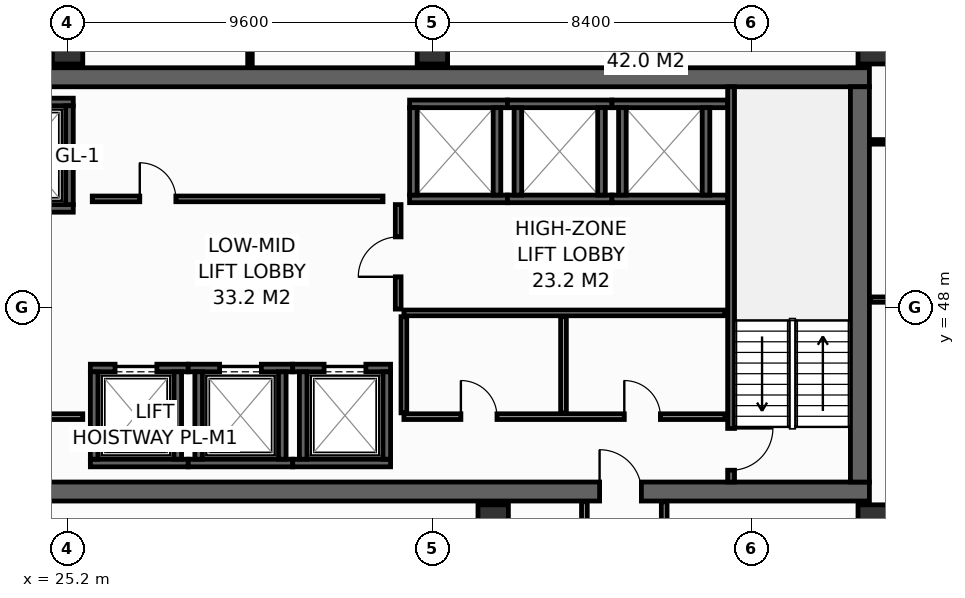
"""IFC4 building model, lengths in metres.
Left out: names, types, materials, properties, quantities, classifications, styles, units other than length and angle.
Written with IfcOpenShell. Run it as: python <this file> out.ifc"""

import sys

from ifc_helpers import new_model, si_unit, direction, frame, frame_2d, origin, origin_2d, place, context, subcontext, project, spatial, rectangle, hollow_rectangle, extrude, element, fill, save


model = new_model("IFC4")
c1 = context("Model", 3, precision=1e-05, world=origin(), true_north=direction((0.0, 1.0)))
c2 = subcontext(c1, "Body", "Model", "MODEL_VIEW")
j1 = project(units=[si_unit("LENGTHUNIT", "METRE"), si_unit("PLANEANGLEUNIT", "RADIAN")], contexts=[c1])
p1 = place(None, origin())
s1 = spatial("IfcSite", under=j1, at=p1, CompositionType="ELEMENT")
p2 = place(p1, origin())
s2 = spatial("IfcBuilding", under=s1, at=p2, CompositionType="ELEMENT")
p3 = place(p2, frame((0.0, 0.0, 217.0)))
s3 = spatial("IfcBuildingStorey", under=s2, at=p3, CompositionType="ELEMENT", Elevation=217.0)
p4 = place(p3, frame((13.6, 43.15, 0.0), z_axis=(0.0, 0.0, 1.0), x_axis=(1.0, 0.0, 0.0)))
e1 = element("IfcWall", 1, at=p4, inside=s3, PredefinedType="SHEAR", context=c2, shape_type="SweptSolid", body=[
    extrude(rectangle(XDim=32.7, YDim=0.5, at=frame_2d((16.35, 0.0))), origin(), (0.0, 0.0, 1.0), 3.55),
])
p5 = place(p4, frame((5.4, 0.0, 0.0)))
e2 = element("IfcOpeningElement", 2, at=p5, cuts=e1, PredefinedType="OPENING", context=c2, shape_type="SweptSolid", body=[
    extrude(rectangle(XDim=1.1, YDim=2.15, at=frame_2d((0.55, 1.075))), frame((0.0, 0.26, 0.0), z_axis=(0.0, -1.0, 0.0), x_axis=(1.0, 0.0, 0.0)), (0.0, 0.0, 1.0), 0.52),
])
p6 = place(p4, frame((25.6, 0.0, 0.0)))
e3 = element("IfcOpeningElement", 3, at=p6, cuts=e1, PredefinedType="OPENING", context=c2, shape_type="SweptSolid", body=[
    extrude(rectangle(XDim=1.1, YDim=2.15, at=frame_2d((0.55, 1.075))), frame((0.0, 0.26, 0.0), z_axis=(0.0, -1.0, 0.0), x_axis=(1.0, 0.0, 0.0)), (0.0, 0.0, 1.0), 0.52),
])
p7 = place(p3, frame((13.6, 54.05, 0.0), z_axis=(0.0, 0.0, 1.0), x_axis=(1.0, 0.0, 0.0)))
e4 = element("IfcWall", 4, at=p7, inside=s3, PredefinedType="SHEAR", context=c2, shape_type="SweptSolid", body=[
    extrude(rectangle(XDim=32.7, YDim=0.5, at=frame_2d((16.35, 0.0))), origin(), (0.0, 0.0, 1.0), 3.55),
])
p8 = place(p3, frame((46.05, 43.4, 0.0), z_axis=(0.0, 0.0, 1.0), x_axis=(0.0, 1.0, 0.0)))
e5 = element("IfcWall", 5, at=p8, inside=s3, PredefinedType="SHEAR", context=c2, shape_type="SweptSolid", body=[
    extrude(rectangle(XDim=10.4, YDim=0.5, at=frame_2d((5.2, 0.0))), origin(), (0.0, 0.0, 1.0), 3.55),
])
for number, where, z_axis, x_axis in (
    (6, (25.2, 54.8, 0.0), (0.0, 0.0, 1.0), (1.0, 0.0, 0.0)),
    (7, (34.8, 54.8, 0.0), (0.0, 0.0, 1.0), (1.0, 0.0, 0.0)),
    (8, (46.4, 54.8, 0.0), (0.0, 0.0, 1.0), (1.0, 0.0, 0.0)),
    (9, (36.4, 42.4, 0.0), (0.0, 0.0, 1.0), (1.0, 0.0, 0.0)),
    (10, (46.4, 42.4, 0.0), (0.0, 0.0, 1.0), (1.0, 0.0, 0.0)),
):
    element("IfcColumn", number, at=place(p3, frame(where, z_axis=z_axis, x_axis=x_axis)), inside=s3, PredefinedType="COLUMN", context=c2, shape_type="SweptSolid", body=[
        extrude(hollow_rectangle(XDim=0.8, YDim=0.8, WallThickness=0.036, at=origin_2d()), origin(), (0.0, 0.0, 1.0), 3.8),
    ])
p9 = place(p3, frame((22.5, 50.6, 0.0), z_axis=(0.0, 0.0, 1.0), x_axis=(1.0, 0.0, 0.0)))
e11 = element("IfcWall", 11, at=p9, inside=s3, PredefinedType="SHEAR", context=c2, shape_type="SweptSolid", body=[
    extrude(rectangle(XDim=2.85, YDim=0.2, at=frame_2d((1.425, 0.0))), origin(), (0.0, 0.0, 1.0), 3.55),
])
p10 = place(p9, frame((0.925, 0.0, 0.0)))
e12 = element("IfcOpeningElement", 12, at=p10, cuts=e11, PredefinedType="OPENING", context=c2, shape_type="SweptSolid", body=[
    extrude(rectangle(XDim=1.25, YDim=2.3, at=frame_2d((0.625, 1.15))), frame((0.0, 0.11, 0.0), z_axis=(0.0, -1.0, 0.0), x_axis=(1.0, 0.0, 0.0)), (0.0, 0.0, 1.0), 0.22),
])
p11 = place(p3, frame((22.5, 53.4, 0.0), z_axis=(0.0, 0.0, 1.0), x_axis=(1.0, 0.0, 0.0)))
e13 = element("IfcWall", 13, at=p11, inside=s3, PredefinedType="SHEAR", context=c2, shape_type="SweptSolid", body=[
    extrude(rectangle(XDim=2.85, YDim=0.2, at=frame_2d((1.425, 0.0))), origin(), (0.0, 0.0, 1.0), 3.55),
])
p12 = place(p3, frame((25.25, 50.7, 0.0), z_axis=(0.0, 0.0, 1.0), x_axis=(0.0, 1.0, 0.0)))
e14 = element("IfcWall", 14, at=p12, inside=s3, PredefinedType="SHEAR", context=c2, shape_type="SweptSolid", body=[
    extrude(rectangle(XDim=2.6, YDim=0.2, at=frame_2d((1.3, 0.0))), origin(), (0.0, 0.0, 1.0), 3.55),
])
p13 = place(p3, frame((25.8, 43.9, 0.0), z_axis=(0.0, 0.0, 1.0), x_axis=(1.0, 0.0, 0.0)))
e15 = element("IfcWall", 15, at=p13, inside=s3, PredefinedType="SHEAR", context=c2, shape_type="SweptSolid", body=[
    extrude(rectangle(XDim=2.575, YDim=0.2, at=frame_2d((1.288, 0.0))), origin(), (0.0, 0.0, 1.0), 3.55),
])
p14 = place(p3, frame((25.8, 46.4, 0.0), z_axis=(0.0, 0.0, 1.0), x_axis=(1.0, 0.0, 0.0)))
e16 = element("IfcWall", 16, at=p14, inside=s3, PredefinedType="SHEAR", context=c2, shape_type="SweptSolid", body=[
    extrude(rectangle(XDim=2.575, YDim=0.2, at=frame_2d((1.288, 0.0))), origin(), (0.0, 0.0, 1.0), 3.55),
])
p15 = place(p14, frame((0.65, 0.0, 0.0)))
e17 = element("IfcOpeningElement", 17, at=p15, cuts=e16, PredefinedType="OPENING", context=c2, shape_type="SweptSolid", body=[
    extrude(rectangle(XDim=1.1, YDim=2.2, at=frame_2d((0.55, 1.1))), frame((0.0, 0.11, 0.0), z_axis=(0.0, -1.0, 0.0), x_axis=(1.0, 0.0, 0.0)), (0.0, 0.0, 1.0), 0.22),
])
for number, where, z_axis, x_axis in (
    (18, (25.9, 44.0, 0.0), (0.0, 0.0, 1.0), (0.0, 1.0, 0.0)),
    (19, (28.1, 44.0, 0.0), (0.0, 0.0, 1.0), (0.0, 1.0, 0.0)),
):
    element("IfcWall", number, at=place(p3, frame(where, z_axis=z_axis, x_axis=x_axis)), inside=s3, PredefinedType="SHEAR", context=c2, shape_type="SweptSolid", body=[
        extrude(rectangle(XDim=2.3, YDim=0.2, at=frame_2d((1.15, 0.0))), origin(), (0.0, 0.0, 1.0), 3.55),
    ])
p16 = place(p3, frame((28.375, 43.9, 0.0), z_axis=(0.0, 0.0, 1.0), x_axis=(1.0, 0.0, 0.0)))
e20 = element("IfcWall", 20, at=p16, inside=s3, PredefinedType="SHEAR", context=c2, shape_type="SweptSolid", body=[
    extrude(rectangle(XDim=2.75, YDim=0.2, at=frame_2d((1.375, 0.0))), origin(), (0.0, 0.0, 1.0), 3.55),
])
p17 = place(p3, frame((28.375, 46.4, 0.0), z_axis=(0.0, 0.0, 1.0), x_axis=(1.0, 0.0, 0.0)))
e21 = element("IfcWall", 21, at=p17, inside=s3, PredefinedType="SHEAR", context=c2, shape_type="SweptSolid", body=[
    extrude(rectangle(XDim=2.75, YDim=0.2, at=frame_2d((1.375, 0.0))), origin(), (0.0, 0.0, 1.0), 3.55),
])
p18 = place(p17, frame((0.825, 0.0, 0.0)))
e22 = element("IfcOpeningElement", 22, at=p18, cuts=e21, PredefinedType="OPENING", context=c2, shape_type="SweptSolid", body=[
    extrude(rectangle(XDim=1.1, YDim=2.2, at=frame_2d((0.55, 1.1))), frame((0.0, 0.11, 0.0), z_axis=(0.0, -1.0, 0.0), x_axis=(1.0, 0.0, 0.0)), (0.0, 0.0, 1.0), 0.22),
])
for number, where, z_axis, x_axis in (
    (23, (28.65, 44.0, 0.0), (0.0, 0.0, 1.0), (0.0, 1.0, 0.0)),
    (24, (30.85, 44.0, 0.0), (0.0, 0.0, 1.0), (0.0, 1.0, 0.0)),
):
    element("IfcWall", number, at=place(p3, frame(where, z_axis=z_axis, x_axis=x_axis)), inside=s3, PredefinedType="SHEAR", context=c2, shape_type="SweptSolid", body=[
        extrude(rectangle(XDim=2.3, YDim=0.2, at=frame_2d((1.15, 0.0))), origin(), (0.0, 0.0, 1.0), 3.55),
    ])
p19 = place(p3, frame((31.125, 43.9, 0.0), z_axis=(0.0, 0.0, 1.0), x_axis=(1.0, 0.0, 0.0)))
e25 = element("IfcWall", 25, at=p19, inside=s3, PredefinedType="SHEAR", context=c2, shape_type="SweptSolid", body=[
    extrude(rectangle(XDim=2.575, YDim=0.2, at=frame_2d((1.288, 0.0))), origin(), (0.0, 0.0, 1.0), 3.55),
])
p20 = place(p3, frame((31.125, 46.4, 0.0), z_axis=(0.0, 0.0, 1.0), x_axis=(1.0, 0.0, 0.0)))
e26 = element("IfcWall", 26, at=p20, inside=s3, PredefinedType="SHEAR", context=c2, shape_type="SweptSolid", body=[
    extrude(rectangle(XDim=2.575, YDim=0.2, at=frame_2d((1.288, 0.0))), origin(), (0.0, 0.0, 1.0), 3.55),
])
p21 = place(p20, frame((0.825, 0.0, 0.0)))
e27 = element("IfcOpeningElement", 27, at=p21, cuts=e26, PredefinedType="OPENING", context=c2, shape_type="SweptSolid", body=[
    extrude(rectangle(XDim=1.1, YDim=2.2, at=frame_2d((0.55, 1.1))), frame((0.0, 0.11, 0.0), z_axis=(0.0, -1.0, 0.0), x_axis=(1.0, 0.0, 0.0)), (0.0, 0.0, 1.0), 0.22),
])
for number, where, z_axis, x_axis in (
    (28, (31.4, 44.0, 0.0), (0.0, 0.0, 1.0), (0.0, 1.0, 0.0)),
    (29, (33.6, 44.0, 0.0), (0.0, 0.0, 1.0), (0.0, 1.0, 0.0)),
):
    element("IfcWall", number, at=place(p3, frame(where, z_axis=z_axis, x_axis=x_axis)), inside=s3, PredefinedType="SHEAR", context=c2, shape_type="SweptSolid", body=[
        extrude(rectangle(XDim=2.3, YDim=0.2, at=frame_2d((1.15, 0.0))), origin(), (0.0, 0.0, 1.0), 3.55),
    ])
for number, where, z_axis, x_axis in (
    (30, (34.2, 50.85, 0.0), (0.0, 0.0, 1.0), (1.0, 0.0, 0.0)),
    (31, (34.2, 53.35, 0.0), (0.0, 0.0, 1.0), (1.0, 0.0, 0.0)),
):
    element("IfcWall", number, at=place(p3, frame(where, z_axis=z_axis, x_axis=x_axis)), inside=s3, PredefinedType="SHEAR", context=c2, shape_type="SweptSolid", body=[
        extrude(rectangle(XDim=2.575, YDim=0.2, at=frame_2d((1.288, 0.0))), origin(), (0.0, 0.0, 1.0), 3.55),
    ])
for number, where, z_axis, x_axis in (
    (32, (34.3, 50.95, 0.0), (0.0, 0.0, 1.0), (0.0, 1.0, 0.0)),
    (33, (36.5, 50.95, 0.0), (0.0, 0.0, 1.0), (0.0, 1.0, 0.0)),
):
    element("IfcWall", number, at=place(p3, frame(where, z_axis=z_axis, x_axis=x_axis)), inside=s3, PredefinedType="SHEAR", context=c2, shape_type="SweptSolid", body=[
        extrude(rectangle(XDim=2.3, YDim=0.2, at=frame_2d((1.15, 0.0))), origin(), (0.0, 0.0, 1.0), 3.55),
    ])
for number, where, z_axis, x_axis in (
    (34, (36.775, 50.85, 0.0), (0.0, 0.0, 1.0), (1.0, 0.0, 0.0)),
    (35, (36.775, 53.35, 0.0), (0.0, 0.0, 1.0), (1.0, 0.0, 0.0)),
):
    element("IfcWall", number, at=place(p3, frame(where, z_axis=z_axis, x_axis=x_axis)), inside=s3, PredefinedType="SHEAR", context=c2, shape_type="SweptSolid", body=[
        extrude(rectangle(XDim=2.75, YDim=0.2, at=frame_2d((1.375, 0.0))), origin(), (0.0, 0.0, 1.0), 3.55),
    ])
for number, where, z_axis, x_axis in (
    (36, (37.05, 50.95, 0.0), (0.0, 0.0, 1.0), (0.0, 1.0, 0.0)),
    (37, (39.25, 50.95, 0.0), (0.0, 0.0, 1.0), (0.0, 1.0, 0.0)),
):
    element("IfcWall", number, at=place(p3, frame(where, z_axis=z_axis, x_axis=x_axis)), inside=s3, PredefinedType="SHEAR", context=c2, shape_type="SweptSolid", body=[
        extrude(rectangle(XDim=2.3, YDim=0.2, at=frame_2d((1.15, 0.0))), origin(), (0.0, 0.0, 1.0), 3.55),
    ])
for number, where, z_axis, x_axis in (
    (38, (39.525, 50.85, 0.0), (0.0, 0.0, 1.0), (1.0, 0.0, 0.0)),
    (39, (39.525, 53.35, 0.0), (0.0, 0.0, 1.0), (1.0, 0.0, 0.0)),
):
    element("IfcWall", number, at=place(p3, frame(where, z_axis=z_axis, x_axis=x_axis)), inside=s3, PredefinedType="SHEAR", context=c2, shape_type="SweptSolid", body=[
        extrude(rectangle(XDim=3.045, YDim=0.2, at=frame_2d((1.522, 0.0))), origin(), (0.0, 0.0, 1.0), 3.55),
    ])
for number, where, z_axis, x_axis in (
    (40, (39.8, 50.95, 0.0), (0.0, 0.0, 1.0), (0.0, 1.0, 0.0)),
    (41, (42.0, 50.95, 0.0), (0.0, 0.0, 1.0), (0.0, 1.0, 0.0)),
):
    element("IfcWall", number, at=place(p3, frame(where, z_axis=z_axis, x_axis=x_axis)), inside=s3, PredefinedType="SHEAR", context=c2, shape_type="SweptSolid", body=[
        extrude(rectangle(XDim=2.3, YDim=0.2, at=frame_2d((1.15, 0.0))), origin(), (0.0, 0.0, 1.0), 3.55),
    ])
p22 = place(p3, frame((42.66, 53.8, 0.0), z_axis=(0.0, 0.0, 1.0), x_axis=(0.0, -1.0, 0.0)))
e42 = element("IfcWall", 42, at=p22, inside=s3, PredefinedType="SHEAR", context=c2, shape_type="SweptSolid", body=[
    extrude(rectangle(XDim=10.4, YDim=0.18, at=frame_2d((5.2, 0.0))), origin(), (0.0, 0.0, 1.0), 3.55),
])
p23 = place(p22, frame((8.99, 0.0, 0.0)))
e43 = element("IfcOpeningElement", 43, at=p23, cuts=e42, PredefinedType="OPENING", context=c2, shape_type="SweptSolid", body=[
    extrude(rectangle(XDim=1.1, YDim=2.15, at=frame_2d((0.55, 1.075))), frame((0.0, 0.1, 0.0), z_axis=(0.0, -1.0, 0.0), x_axis=(1.0, 0.0, 0.0)), (0.0, 0.0, 1.0), 0.2),
])
p24 = place(p3, frame((22.68, 45.12, 0.0), z_axis=(0.0, 0.0, 1.0), x_axis=(1.0, 0.0, 0.0)))
e44 = element("IfcWall", 44, at=p24, inside=s3, PredefinedType="PARTITIONING", context=c2, shape_type="SweptSolid", body=[
    extrude(rectangle(XDim=2.92, YDim=0.15, at=frame_2d((1.46, 0.0))), origin(), (0.0, 0.0, 1.0), 3.55),
])
p25 = place(p24, frame((0.85, 0.0, 0.0)))
e45 = element("IfcOpeningElement", 45, at=p25, cuts=e44, PredefinedType="OPENING", context=c2, shape_type="SweptSolid", body=[
    extrude(rectangle(XDim=1.1, YDim=2.15, at=frame_2d((0.55, 1.075))), frame((0.0, 0.085, 0.0), z_axis=(0.0, -1.0, 0.0), x_axis=(1.0, 0.0, 0.0)), (0.0, 0.0, 1.0), 0.17),
])
p26 = place(p3, frame((33.9, 47.95, 0.0), z_axis=(0.0, 0.0, 1.0), x_axis=(0.0, 1.0, 0.0)))
e46 = element("IfcWall", 46, at=p26, inside=s3, PredefinedType="PARTITIONING", context=c2, shape_type="SweptSolid", body=[
    extrude(rectangle(XDim=2.75, YDim=0.15, at=frame_2d((1.375, 0.0))), origin(), (0.0, 0.0, 1.0), 3.55),
])
p27 = place(p26, frame((0.85, 0.0, 0.0)))
e47 = element("IfcOpeningElement", 47, at=p27, cuts=e46, PredefinedType="OPENING", context=c2, shape_type="SweptSolid", body=[
    extrude(rectangle(XDim=1.05, YDim=2.15, at=frame_2d((0.525, 1.075))), frame((0.0, 0.085, 0.0), z_axis=(0.0, -1.0, 0.0), x_axis=(1.0, 0.0, 0.0)), (0.0, 0.0, 1.0), 0.17),
])
p28 = place(p3, frame((34.05, 45.12, 0.0), z_axis=(0.0, 0.0, 1.0), x_axis=(1.0, 0.0, 0.0)))
e48 = element("IfcWall", 48, at=p28, inside=s3, PredefinedType="PARTITIONING", context=c2, shape_type="SweptSolid", body=[
    extrude(rectangle(XDim=8.45, YDim=0.15, at=frame_2d((4.225, 0.0))), origin(), (0.0, 0.0, 1.0), 3.55),
])
p29 = place(p28, frame((1.5, 0.0, 0.0)))
e49 = element("IfcOpeningElement", 49, at=p29, cuts=e48, PredefinedType="OPENING", context=c2, shape_type="SweptSolid", body=[
    extrude(rectangle(XDim=0.95, YDim=2.15, at=frame_2d((0.475, 1.075))), frame((0.0, 0.085, 0.0), z_axis=(0.0, -1.0, 0.0), x_axis=(1.0, 0.0, 0.0)), (0.0, 0.0, 1.0), 0.17),
])
p30 = place(p28, frame((5.8, 0.0, 0.0)))
e50 = element("IfcOpeningElement", 50, at=p30, cuts=e48, PredefinedType="OPENING", context=c2, shape_type="SweptSolid", body=[
    extrude(rectangle(XDim=0.95, YDim=2.15, at=frame_2d((0.475, 1.075))), frame((0.0, 0.085, 0.0), z_axis=(0.0, -1.0, 0.0), x_axis=(1.0, 0.0, 0.0)), (0.0, 0.0, 1.0), 0.17),
])
p31 = place(p3, frame((34.05, 47.85, 0.0), z_axis=(0.0, 0.0, 1.0), x_axis=(1.0, 0.0, 0.0)))
e51 = element("IfcWall", 51, at=p31, inside=s3, PredefinedType="PARTITIONING", context=c2, shape_type="SweptSolid", body=[
    extrude(rectangle(XDim=8.45, YDim=0.15, at=frame_2d((4.225, 0.0))), origin(), (0.0, 0.0, 1.0), 3.55),
])
for number, where, z_axis, x_axis in (
    (52, (38.25, 45.22, 0.0), (0.0, 0.0, 1.0), (0.0, 1.0, 0.0)),
    (53, (34.05, 45.22, 0.0), (0.0, 0.0, 1.0), (0.0, 1.0, 0.0)),
):
    element("IfcWall", number, at=place(p3, frame(where, z_axis=z_axis, x_axis=x_axis)), inside=s3, PredefinedType="PARTITIONING", context=c2, shape_type="SweptSolid", body=[
        extrude(rectangle(XDim=2.53, YDim=0.15, at=frame_2d((1.265, 0.0))), origin(), (0.0, 0.0, 1.0), 3.55),
    ])
p32 = place(p3, frame((25.85, 50.85, 0.0), z_axis=(0.0, 0.0, 1.0), x_axis=(1.0, 0.0, 0.0)))
e54 = element("IfcWall", 54, at=p32, inside=s3, PredefinedType="PARTITIONING", context=c2, shape_type="SweptSolid", body=[
    extrude(rectangle(XDim=7.65, YDim=0.15, at=frame_2d((3.825, 0.0))), origin(), (0.0, 0.0, 1.0), 3.55),
])
p33 = place(p32, frame((1.25, 0.0, 0.0)))
e55 = element("IfcOpeningElement", 55, at=p33, cuts=e54, PredefinedType="OPENING", context=c2, shape_type="SweptSolid", body=[
    extrude(rectangle(XDim=0.95, YDim=2.15, at=frame_2d((0.475, 1.075))), frame((0.0, 0.085, 0.0), z_axis=(0.0, -1.0, 0.0), x_axis=(1.0, 0.0, 0.0)), (0.0, 0.0, 1.0), 0.17),
])
p34 = place(p3, frame((46.15, 40.84, 0.0), z_axis=(0.0, 0.0, 1.0), x_axis=(0.0, 1.0, 0.0)))
e56 = element("IfcWall", 56, at=p34, inside=s3, PredefinedType="PARTITIONING", context=c2, shape_type="SweptSolid", body=[
    extrude(rectangle(XDim=2.04, YDim=0.14, at=frame_2d((1.02, 0.0))), origin(), (0.0, 0.0, 1.0), 3.55),
])
p35 = place(p3, frame((46.32, 48.2, 0.0), z_axis=(0.0, 0.0, 1.0), x_axis=(1.0, 0.0, 0.0)))
e57 = element("IfcWall", 57, at=p35, inside=s3, PredefinedType="PARTITIONING", context=c2, shape_type="SweptSolid", body=[
    extrude(rectangle(XDim=3.88, YDim=0.14, at=frame_2d((1.94, 0.0))), origin(), (0.0, 0.0, 1.0), 3.55),
])
p36 = place(p3, frame((46.32, 52.35, 0.0), z_axis=(0.0, 0.0, 1.0), x_axis=(1.0, 0.0, 0.0)))
e58 = element("IfcWall", 58, at=p36, inside=s3, PredefinedType="PARTITIONING", context=c2, shape_type="SweptSolid", body=[
    extrude(rectangle(XDim=3.88, YDim=0.12, at=frame_2d((1.94, 0.0))), origin(), (0.0, 0.0, 1.0), 3.55),
])
p37 = place(p3, frame((30.0, 54.32, 0.0), z_axis=(0.0, 0.0, 1.0), x_axis=(0.0, 1.0, 0.0)))
e59 = element("IfcWall", 59, at=p37, inside=s3, PredefinedType="PARTITIONING", context=c2, shape_type="SweptSolid", body=[
    extrude(rectangle(XDim=1.675, YDim=0.12, at=frame_2d((0.837, 0.0))), origin(), (0.0, 0.0, 1.0), 2.935),
])
for number, where, z_axis, x_axis in (
    (60, (38.8, 40.75, 0.0), (0.0, 0.0, 1.0), (0.0, 1.0, 0.0)),
    (61, (40.9, 40.75, 0.0), (0.0, 0.0, 1.0), (0.0, 1.0, 0.0)),
):
    element("IfcWall", number, at=place(p3, frame(where, z_axis=z_axis, x_axis=x_axis)), inside=s3, PredefinedType="PARTITIONING", context=c2, shape_type="SweptSolid", body=[
        extrude(rectangle(XDim=2.13, YDim=0.15, at=frame_2d((1.065, 0.0))), origin(), (0.0, 0.0, 1.0), 3.55),
    ])
p38 = place(p15, origin())
e62 = element("IfcDoor", 62, at=p38, inside=s3, OperationType="SLIDING_TO_LEFT", PredefinedType="DOOR", context=c2, shape_type="SweptSolid", body=[
    extrude(rectangle(XDim=1.1, YDim=2.2, at=frame_2d((0.55, 1.1))), frame((0.0, 0.025, 0.0), z_axis=(0.0, -1.0, 0.0), x_axis=(1.0, 0.0, 0.0)), (0.0, 0.0, 1.0), 0.05),
])
fill(e17, e62)
p39 = place(p18, origin())
e63 = element("IfcDoor", 63, at=p39, inside=s3, OperationType="SLIDING_TO_LEFT", PredefinedType="DOOR", context=c2, shape_type="SweptSolid", body=[
    extrude(rectangle(XDim=1.1, YDim=2.2, at=frame_2d((0.55, 1.1))), frame((0.0, 0.025, 0.0), z_axis=(0.0, -1.0, 0.0), x_axis=(1.0, 0.0, 0.0)), (0.0, 0.0, 1.0), 0.05),
])
fill(e22, e63)
p40 = place(p21, origin())
e64 = element("IfcDoor", 64, at=p40, inside=s3, OperationType="SLIDING_TO_LEFT", PredefinedType="DOOR", context=c2, shape_type="SweptSolid", body=[
    extrude(rectangle(XDim=1.1, YDim=2.2, at=frame_2d((0.55, 1.1))), frame((0.0, 0.025, 0.0), z_axis=(0.0, -1.0, 0.0), x_axis=(1.0, 0.0, 0.0)), (0.0, 0.0, 1.0), 0.05),
])
fill(e27, e64)
p41 = place(p23, origin())
e65 = element("IfcDoor", 65, at=p41, inside=s3, OperationType="SINGLE_SWING_LEFT", PredefinedType="DOOR", context=c2, shape_type="SweptSolid", body=[
    extrude(rectangle(XDim=1.1, YDim=2.15, at=frame_2d((0.55, 1.075))), frame((0.0, 0.025, 0.0), z_axis=(0.0, -1.0, 0.0), x_axis=(1.0, 0.0, 0.0)), (0.0, 0.0, 1.0), 0.05),
])
fill(e43, e65)
p42 = place(p6, origin())
e66 = element("IfcDoor", 66, at=p42, inside=s3, OperationType="SINGLE_SWING_LEFT", PredefinedType="DOOR", context=c2, shape_type="SweptSolid", body=[
    extrude(rectangle(XDim=1.1, YDim=2.15, at=frame_2d((0.55, 1.075))), frame((0.0, 0.025, 0.0), z_axis=(0.0, -1.0, 0.0), x_axis=(1.0, 0.0, 0.0)), (0.0, 0.0, 1.0), 0.05),
])
fill(e3, e66)
p43 = place(p27, origin())
e67 = element("IfcDoor", 67, at=p43, inside=s3, OperationType="SINGLE_SWING_LEFT", PredefinedType="DOOR", context=c2, shape_type="SweptSolid", body=[
    extrude(rectangle(XDim=1.05, YDim=2.15, at=frame_2d((0.525, 1.075))), frame((0.0, 0.025, 0.0), z_axis=(0.0, -1.0, 0.0), x_axis=(1.0, 0.0, 0.0)), (0.0, 0.0, 1.0), 0.05),
])
fill(e47, e67)
p44 = place(p29, origin())
e68 = element("IfcDoor", 68, at=p44, inside=s3, OperationType="SINGLE_SWING_LEFT", PredefinedType="DOOR", context=c2, shape_type="SweptSolid", body=[
    extrude(rectangle(XDim=0.95, YDim=2.15, at=frame_2d((0.475, 1.075))), frame((0.0, 0.025, 0.0), z_axis=(0.0, -1.0, 0.0), x_axis=(1.0, 0.0, 0.0)), (0.0, 0.0, 1.0), 0.05),
])
fill(e49, e68)
p45 = place(p30, origin())
e69 = element("IfcDoor", 69, at=p45, inside=s3, OperationType="SINGLE_SWING_LEFT", PredefinedType="DOOR", context=c2, shape_type="SweptSolid", body=[
    extrude(rectangle(XDim=0.95, YDim=2.15, at=frame_2d((0.475, 1.075))), frame((0.0, 0.025, 0.0), z_axis=(0.0, -1.0, 0.0), x_axis=(1.0, 0.0, 0.0)), (0.0, 0.0, 1.0), 0.05),
])
fill(e50, e69)
p46 = place(p33, origin())
e70 = element("IfcDoor", 70, at=p46, inside=s3, OperationType="SINGLE_SWING_LEFT", PredefinedType="DOOR", context=c2, shape_type="SweptSolid", body=[
    extrude(rectangle(XDim=0.95, YDim=2.15, at=frame_2d((0.475, 1.075))), frame((0.0, 0.025, 0.0), z_axis=(0.0, -1.0, 0.0), x_axis=(1.0, 0.0, 0.0)), (0.0, 0.0, 1.0), 0.05),
])
fill(e55, e70)
save(model, sys.argv[1])
